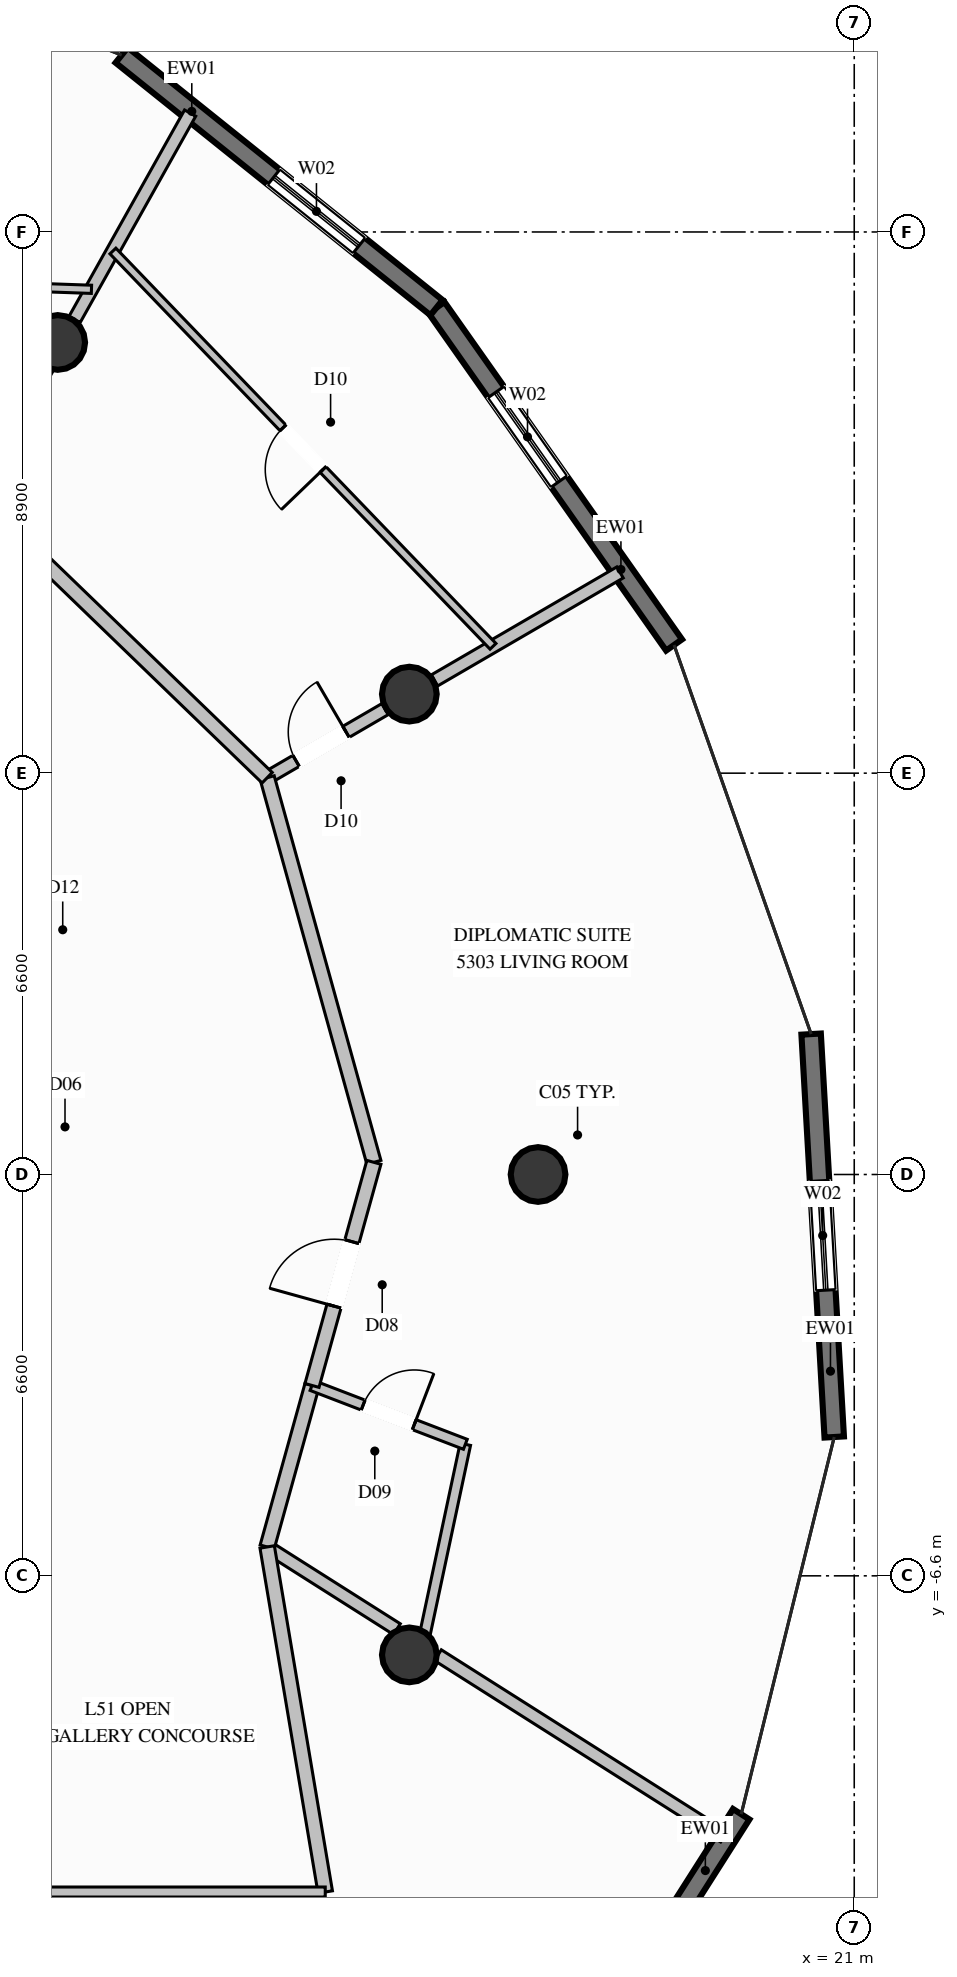
"""IFC4 building model, lengths in metres.
Left out: names, types, materials, properties, quantities, classifications, styles, units other than length and angle.
Written with IfcOpenShell. Run it as: python <this file> out.ifc"""

import sys

from ifc_helpers import new_model, si_unit, direction, frame, frame_2d, origin, origin_2d, place, context, subcontext, project, spatial, rectangle, circle, extrude, element, fill, save


model = new_model("IFC4")
c1 = context("Model", 3, precision=1e-05, world=origin(), true_north=direction((0.0, 1.0)))
c2 = subcontext(c1, "Body", "Model", "MODEL_VIEW")
j1 = project(units=[si_unit("LENGTHUNIT", "METRE"), si_unit("PLANEANGLEUNIT", "RADIAN")], contexts=[c1])
p1 = place(None, origin())
s1 = spatial("IfcSite", under=j1, at=p1, CompositionType="ELEMENT")
p2 = place(p1, origin())
s2 = spatial("IfcBuilding", under=s1, at=p2, CompositionType="ELEMENT")
p3 = place(p2, frame((0.0, 0.0, 198.4)))
s3 = spatial("IfcBuildingStorey", under=s2, at=p3, CompositionType="ELEMENT", Elevation=198.4)
for number, where, z_axis, x_axis in (
    (1, (15.8, 0.0, 0.0), (0.0, 0.0, 1.0), (1.0, 0.0, 0.0)),
    (2, (13.683, 7.9, 0.0), (0.0, 0.0, 1.0), (1.0, 0.0, 0.0)),
    (3, (7.9, 13.683, 0.0), (0.0, 0.0, 1.0), (1.0, 0.0, 0.0)),
    (4, (13.683, -7.9, 0.0), (0.0, 0.0, 1.0), (1.0, 0.0, 0.0)),
):
    element("IfcColumn", number, at=place(p3, frame(where, z_axis=z_axis, x_axis=x_axis)), inside=s3, PredefinedType="COLUMN", context=c2, shape_type="SweptSolid", body=[
        extrude(circle(Radius=0.45, at=origin_2d()), origin(), (0.0, 0.0, 1.0), 3.6),
    ])
p4 = place(p3, frame((19.141, -10.52, 0.0), z_axis=(0.0, 0.0, 1.0), x_axis=(-0.536805938934, -0.843705744869, 0.0)))
e5 = element("IfcWall", 5, at=p4, inside=s3, PredefinedType="SOLIDWALL", context=c2, shape_type="SweptSolid", body=[
    extrude(rectangle(XDim=6.133, YDim=0.32, at=frame_2d((3.066, 0.0))), origin(), (0.0, 0.0, 1.0), 3.36),
])
p5 = place(p4, frame((2.447, 0.0, 0.35)))
e6 = element("IfcOpeningElement", 6, at=p5, cuts=e5, PredefinedType="OPENING", context=c2, shape_type="SweptSolid", body=[
    extrude(rectangle(XDim=1.8, YDim=2.6, at=frame_2d((0.9, 1.3))), frame((0.0, 0.17, 0.0), z_axis=(0.0, -1.0, 0.0), x_axis=(1.0, 0.0, 0.0)), (0.0, 0.0, 1.0), 0.34),
])
p6 = place(p3, frame((20.291, 2.309, 0.0), z_axis=(0.0, 0.0, 1.0), x_axis=(0.057238356755, -0.998360541346, 0.0)))
e7 = element("IfcWall", 7, at=p6, inside=s3, PredefinedType="SOLIDWALL", context=c2, shape_type="SweptSolid", body=[
    extrude(rectangle(XDim=6.637, YDim=0.32, at=frame_2d((3.318, 0.0))), origin(), (0.0, 0.0, 1.0), 3.36),
])
p7 = place(p6, frame((2.418, 0.0, 0.35)))
e8 = element("IfcOpeningElement", 8, at=p7, cuts=e7, PredefinedType="OPENING", context=c2, shape_type="SweptSolid", body=[
    extrude(rectangle(XDim=1.8, YDim=2.6, at=frame_2d((0.9, 1.3))), frame((0.0, 0.17, 0.0), z_axis=(0.0, -1.0, 0.0), x_axis=(1.0, 0.0, 0.0)), (0.0, 0.0, 1.0), 0.34),
])
p8 = place(p3, frame((14.13, 14.256, 0.0), z_axis=(0.0, 0.0, 1.0), x_axis=(0.575790136357, -0.817597528662, 0.0)))
e9 = element("IfcWall", 9, at=p8, inside=s3, PredefinedType="SOLIDWALL", context=c2, shape_type="SweptSolid", body=[
    extrude(rectangle(XDim=6.786, YDim=0.32, at=frame_2d((3.393, 0.0))), origin(), (0.0, 0.0, 1.0), 3.36),
])
p9 = place(p8, frame((1.699, 0.0, 0.35)))
e10 = element("IfcOpeningElement", 10, at=p9, cuts=e9, PredefinedType="OPENING", context=c2, shape_type="SweptSolid", body=[
    extrude(rectangle(XDim=1.8, YDim=2.6, at=frame_2d((0.9, 1.3))), frame((0.0, 0.17, 0.0), z_axis=(0.0, -1.0, 0.0), x_axis=(1.0, 0.0, 0.0)), (0.0, 0.0, 1.0), 0.34),
])
p10 = place(p3, frame((8.952, 18.408, 0.0), z_axis=(0.0, 0.0, 1.0), x_axis=(0.780172101925, -0.625564937778, 0.0)))
e11 = element("IfcWall", 11, at=p10, inside=s3, PredefinedType="SOLIDWALL", context=c2, shape_type="SweptSolid", body=[
    extrude(rectangle(XDim=6.637, YDim=0.32, at=frame_2d((3.318, 0.0))), origin(), (0.0, 0.0, 1.0), 3.36),
])
p11 = place(p10, frame((3.206, 0.0, 0.35)))
e12 = element("IfcOpeningElement", 12, at=p11, cuts=e11, PredefinedType="OPENING", context=c2, shape_type="SweptSolid", body=[
    extrude(rectangle(XDim=1.8, YDim=2.6, at=frame_2d((0.9, 1.3))), frame((0.0, 0.17, 0.0), z_axis=(0.0, -1.0, 0.0), x_axis=(1.0, 0.0, 0.0)), (0.0, 0.0, 1.0), 0.34),
])
p12 = place(p3, frame((11.345, 6.525, 0.0), z_axis=(0.0, 0.0, 1.0), x_axis=(0.864228712324, 0.5030991282, 0.0)))
e13 = element("IfcWall", 13, at=p12, inside=s3, PredefinedType="PARTITIONING", context=c2, shape_type="SweptSolid", body=[
    extrude(rectangle(XDim=2.242, YDim=0.21, at=frame_2d((1.121, 0.0))), origin(), (0.0, 0.0, 1.0), 2.876),
])
p13 = place(p12, frame((0.55, 0.0, 0.0)))
e14 = element("IfcOpeningElement", 14, at=p13, cuts=e13, PredefinedType="OPENING", context=c2, shape_type="SweptSolid", body=[
    extrude(rectangle(XDim=0.95, YDim=2.1, at=frame_2d((0.475, 1.05))), frame((0.0, 0.115, 0.0), z_axis=(0.0, -1.0, 0.0), x_axis=(1.0, 0.0, 0.0)), (0.0, 0.0, 1.0), 0.23),
])
p14 = place(p3, frame((14.096, 8.125, 0.0), z_axis=(0.0, 0.0, 1.0), x_axis=(0.864327572571, 0.502929266689, 0.0)))
e15 = element("IfcWall", 15, at=p14, inside=s3, PredefinedType="PARTITIONING", context=c2, shape_type="SweptSolid", body=[
    extrude(rectangle(XDim=3.531, YDim=0.21, at=frame_2d((1.766, 0.0))), origin(), (0.0, 0.0, 1.0), 3.36),
])
p15 = place(p3, frame((6.55, 11.155, 0.0), z_axis=(0.0, 0.0, 1.0), x_axis=(0.488535184748, 0.872544195593, 0.0)))
e16 = element("IfcWall", 16, at=p15, inside=s3, PredefinedType="PARTITIONING", context=c2, shape_type="SweptSolid", body=[
    extrude(rectangle(XDim=2.399, YDim=0.21, at=frame_2d((1.199, 0.0))), origin(), (0.0, 0.0, 1.0), 2.876),
])
p16 = place(p3, frame((8.178, 14.062, 0.0), z_axis=(0.0, 0.0, 1.0), x_axis=(0.488561310484, 0.872529567349, 0.0)))
e17 = element("IfcWall", 17, at=p16, inside=s3, PredefinedType="PARTITIONING", context=c2, shape_type="SweptSolid", body=[
    extrude(rectangle(XDim=3.889, YDim=0.21, at=frame_2d((1.944, 0.0))), origin(), (0.0, 0.0, 1.0), 3.36),
])
p17 = place(p3, frame((11.345, -6.125, 0.0), z_axis=(0.0, 0.0, 1.0), x_axis=(0.844619463995, -0.535367127344, 0.0)))
e18 = element("IfcWall", 18, at=p17, inside=s3, PredefinedType="PARTITIONING", context=c2, shape_type="SweptSolid", body=[
    extrude(rectangle(XDim=2.525, YDim=0.21, at=frame_2d((1.263, 0.0))), origin(), (0.0, 0.0, 1.0), 2.876),
])
p18 = place(p3, frame((14.153, -7.905, 0.0), z_axis=(0.0, 0.0, 1.0), x_axis=(0.844611036589, -0.535380422571, 0.0)))
e19 = element("IfcWall", 19, at=p18, inside=s3, PredefinedType="PARTITIONING", context=c2, shape_type="SweptSolid", body=[
    extrude(rectangle(XDim=5.572, YDim=0.21, at=frame_2d((2.786, 0.0))), origin(), (0.0, 0.0, 1.0), 3.36),
])
p19 = place(p3, frame((-2.94, 14.952, 0.0), z_axis=(0.0, 0.0, 1.0), x_axis=(0.999399675895, -0.034645170236, 0.0)))
e20 = element("IfcWall", 20, at=p19, inside=s3, PredefinedType="PARTITIONING", context=c2, shape_type="SweptSolid", body=[
    extrude(rectangle(XDim=11.402, YDim=0.135, at=frame_2d((5.701, 0.0))), origin(), (0.0, 0.0, 1.0), 2.929),
])
p20 = place(p19, frame((5.226, 0.0, 0.0)))
e21 = element("IfcOpeningElement", 21, at=p20, cuts=e20, PredefinedType="OPENING", context=c2, shape_type="SweptSolid", body=[
    extrude(rectangle(XDim=0.95, YDim=2.1, at=frame_2d((0.475, 1.05))), frame((0.0, 0.078, 0.0), z_axis=(0.0, -1.0, 0.0), x_axis=(1.0, 0.0, 0.0)), (0.0, 0.0, 1.0), 0.155),
])
p21 = place(p3, frame((11.345, -6.125, 0.0), z_axis=(0.0, 0.0, 1.0), x_axis=(0.267401739017, 0.963585133743, 0.0)))
e22 = element("IfcWall", 22, at=p21, inside=s3, PredefinedType="PARTITIONING", context=c2, shape_type="SweptSolid", body=[
    extrude(rectangle(XDim=2.756, YDim=0.24, at=frame_2d((1.378, 0.0))), origin(), (0.0, 0.0, 1.0), 3.36),
])
p22 = place(p3, frame((13.9, -7.744, 0.0), z_axis=(0.0, 0.0, 1.0), x_axis=(0.208251685577, 0.978075270853, 0.0)))
e23 = element("IfcWall", 23, at=p22, inside=s3, PredefinedType="PLUMBINGWALL", context=c2, shape_type="SweptSolid", body=[
    extrude(rectangle(XDim=3.381, YDim=0.175, at=frame_2d((1.69, 0.0))), origin(), (0.0, 0.0, 1.0), 2.929),
])
p23 = place(p3, frame((12.082, -3.469, 0.0), z_axis=(0.0, 0.0, 1.0), x_axis=(0.93358996535, -0.358343098995, 0.0)))
e24 = element("IfcWall", 24, at=p23, inside=s3, PredefinedType="PLUMBINGWALL", context=c2, shape_type="SweptSolid", body=[
    extrude(rectangle(XDim=2.701, YDim=0.175, at=frame_2d((1.351, 0.0))), origin(), (0.0, 0.0, 1.0), 3.36),
])
p24 = place(p23, frame((0.901, 0.0, 0.0)))
e25 = element("IfcOpeningElement", 25, at=p24, cuts=e24, PredefinedType="OPENING", context=c2, shape_type="SweptSolid", body=[
    extrude(rectangle(XDim=0.9, YDim=2.1, at=frame_2d((0.45, 1.05))), frame((0.0, 0.098, 0.0), z_axis=(0.0, -1.0, 0.0), x_axis=(1.0, 0.0, 0.0)), (0.0, 0.0, 1.0), 0.195),
])
p25 = place(p3, frame((13.1, 0.2, 0.0), z_axis=(0.0, 0.0, 1.0), x_axis=(-0.26738871748, 0.963588747218, 0.0)))
e26 = element("IfcWall", 26, at=p25, inside=s3, PredefinedType="PARTITIONING", context=c2, shape_type="SweptSolid", body=[
    extrude(rectangle(XDim=6.564, YDim=0.24, at=frame_2d((3.282, 0.0))), origin(), (0.0, 0.0, 1.0), 3.36),
])
p26 = place(p3, frame((12.082, -3.469, 0.0), z_axis=(0.0, 0.0, 1.0), x_axis=(0.267379290897, 0.963591362975, 0.0)))
e27 = element("IfcWall", 27, at=p26, inside=s3, PredefinedType="PARTITIONING", context=c2, shape_type="SweptSolid", body=[
    extrude(rectangle(XDim=3.808, YDim=0.24, at=frame_2d((1.904, 0.0))), origin(), (0.0, 0.0, 1.0), 3.36),
])
p27 = place(p26, frame((1.354, 0.0, 0.0)))
e28 = element("IfcOpeningElement", 28, at=p27, cuts=e27, PredefinedType="OPENING", context=c2, shape_type="SweptSolid", body=[
    extrude(rectangle(XDim=1.1, YDim=2.3, at=frame_2d((0.55, 1.15))), frame((0.0, 0.13, 0.0), z_axis=(0.0, -1.0, 0.0), x_axis=(1.0, 0.0, 0.0)), (0.0, 0.0, 1.0), 0.26),
])
p28 = place(p3, frame((11.345, 6.525, 0.0), z_axis=(0.0, 0.0, 1.0), x_axis=(-0.719360436772, 0.694637000172, 0.0)))
e29 = element("IfcWall", 29, at=p28, inside=s3, PredefinedType="PARTITIONING", context=c2, shape_type="SweptSolid", body=[
    extrude(rectangle(XDim=6.666, YDim=0.24, at=frame_2d((3.333, 0.0))), origin(), (0.0, 0.0, 1.0), 3.36),
])
p29 = place(p3, frame((15.059, 8.686, 0.0), z_axis=(0.0, 0.0, 1.0), x_axis=(-0.693110880217, 0.72083098416, 0.0)))
e30 = element("IfcWall", 30, at=p29, inside=s3, PredefinedType="PARTITIONING", context=c2, shape_type="SweptSolid", body=[
    extrude(rectangle(XDim=9.019, YDim=0.135, at=frame_2d((4.509, 0.0))), origin(), (0.0, 0.0, 1.0), 3.36),
])
p30 = place(p29, frame((4.034, 0.0, 0.0)))
e31 = element("IfcOpeningElement", 31, at=p30, cuts=e30, PredefinedType="OPENING", context=c2, shape_type="SweptSolid", body=[
    extrude(rectangle(XDim=0.95, YDim=2.1, at=frame_2d((0.475, 1.05))), frame((0.0, 0.078, 0.0), z_axis=(0.0, -1.0, 0.0), x_axis=(1.0, 0.0, 0.0)), (0.0, 0.0, 1.0), 0.155),
])
p31 = place(p3, frame((12.3, -11.8, 0.0), z_axis=(0.0, 0.0, 1.0), x_axis=(-0.165960421789, 0.986132414232, 0.0)))
e32 = element("IfcWall", 32, at=p31, inside=s3, PredefinedType="PARTITIONING", context=c2, shape_type="SweptSolid", body=[
    extrude(rectangle(XDim=5.755, YDim=0.24, at=frame_2d((2.877, 0.0))), origin(), (0.0, 0.0, 1.0), 3.36),
])
p32 = place(p3, frame((0.0, -11.8, 0.0), z_axis=(0.0, 0.0, 1.0), x_axis=(1.0, 0.0, 0.0)))
e33 = element("IfcWall", 33, at=p32, inside=s3, PredefinedType="PARTITIONING", context=c2, shape_type="SweptSolid", body=[
    extrude(rectangle(XDim=12.3, YDim=0.165, at=frame_2d((6.15, 0.0))), origin(), (0.0, 0.0, 1.0), 3.36),
])
p33 = place(p32, frame((5.675, 0.0, 0.0)))
e34 = element("IfcOpeningElement", 34, at=p33, cuts=e33, PredefinedType="OPENING", context=c2, shape_type="SweptSolid", body=[
    extrude(rectangle(XDim=0.95, YDim=2.1, at=frame_2d((0.475, 1.05))), frame((0.0, 0.093, 0.0), z_axis=(0.0, -1.0, 0.0), x_axis=(1.0, 0.0, 0.0)), (0.0, 0.0, 1.0), 0.185),
])
p34 = place(p7, origin())
e35 = element("IfcWindow", 35, at=p34, inside=s3, PartitioningType="SINGLE_PANEL", PredefinedType="WINDOW", context=c2, shape_type="SweptSolid", body=[
    extrude(rectangle(XDim=1.8, YDim=2.6, at=frame_2d((0.9, 1.3))), frame((0.0, 0.03, 0.0), z_axis=(0.0, -1.0, 0.0), x_axis=(1.0, 0.0, 0.0)), (0.0, 0.0, 1.0), 0.06),
])
fill(e8, e35)
p35 = place(p9, origin())
e36 = element("IfcWindow", 36, at=p35, inside=s3, PartitioningType="SINGLE_PANEL", PredefinedType="WINDOW", context=c2, shape_type="SweptSolid", body=[
    extrude(rectangle(XDim=1.8, YDim=2.6, at=frame_2d((0.9, 1.3))), frame((0.0, 0.03, 0.0), z_axis=(0.0, -1.0, 0.0), x_axis=(1.0, 0.0, 0.0)), (0.0, 0.0, 1.0), 0.06),
])
fill(e10, e36)
p36 = place(p11, origin())
e37 = element("IfcWindow", 37, at=p36, inside=s3, PartitioningType="SINGLE_PANEL", PredefinedType="WINDOW", context=c2, shape_type="SweptSolid", body=[
    extrude(rectangle(XDim=1.8, YDim=2.6, at=frame_2d((0.9, 1.3))), frame((0.0, 0.03, 0.0), z_axis=(0.0, -1.0, 0.0), x_axis=(1.0, 0.0, 0.0)), (0.0, 0.0, 1.0), 0.06),
])
fill(e12, e37)
p37 = place(p24, origin())
e38 = element("IfcDoor", 38, at=p37, inside=s3, OperationType="SINGLE_SWING_RIGHT", PredefinedType="DOOR", context=c2, shape_type="SweptSolid", body=[
    extrude(rectangle(XDim=0.9, YDim=2.1, at=frame_2d((0.45, 1.05))), frame((0.0, 0.025, 0.0), z_axis=(0.0, -1.0, 0.0), x_axis=(1.0, 0.0, 0.0)), (0.0, 0.0, 1.0), 0.05),
])
fill(e25, e38)
p38 = place(p27, origin())
e39 = element("IfcDoor", 39, at=p38, inside=s3, OperationType="SINGLE_SWING_LEFT", PredefinedType="DOOR", context=c2, shape_type="SweptSolid", body=[
    extrude(rectangle(XDim=1.1, YDim=2.3, at=frame_2d((0.55, 1.15))), frame((0.0, 0.025, 0.0), z_axis=(0.0, -1.0, 0.0), x_axis=(1.0, 0.0, 0.0)), (0.0, 0.0, 1.0), 0.05),
])
fill(e28, e39)
p39 = place(p13, origin())
e40 = element("IfcDoor", 40, at=p39, inside=s3, OperationType="SINGLE_SWING_RIGHT", PredefinedType="DOOR", context=c2, shape_type="SweptSolid", body=[
    extrude(rectangle(XDim=0.95, YDim=2.1, at=frame_2d((0.475, 1.05))), frame((0.0, 0.025, 0.0), z_axis=(0.0, -1.0, 0.0), x_axis=(1.0, 0.0, 0.0)), (0.0, 0.0, 1.0), 0.05),
])
fill(e14, e40)
p40 = place(p30, origin())
e41 = element("IfcDoor", 41, at=p40, inside=s3, OperationType="SINGLE_SWING_LEFT", PredefinedType="DOOR", context=c2, shape_type="SweptSolid", body=[
    extrude(rectangle(XDim=0.95, YDim=2.1, at=frame_2d((0.475, 1.05))), frame((0.0, 0.025, 0.0), z_axis=(0.0, -1.0, 0.0), x_axis=(1.0, 0.0, 0.0)), (0.0, 0.0, 1.0), 0.05),
])
fill(e31, e41)
save(model, sys.argv[1])
